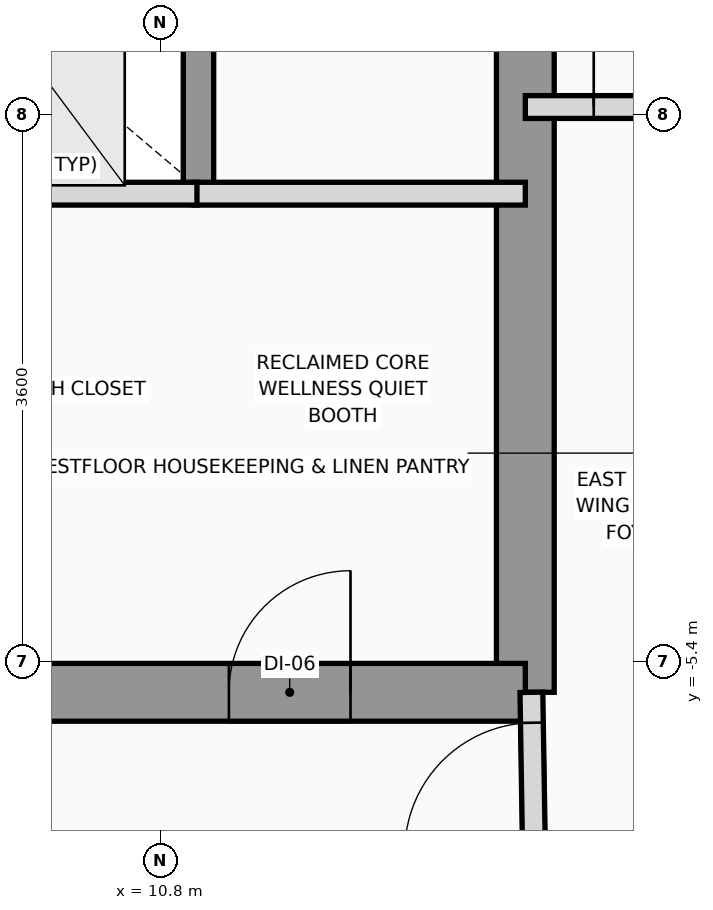
"""IFC4 building model, lengths in metres.
Left out: names, types, materials, properties, quantities, classifications, styles, units other than length and angle.
Written with IfcOpenShell. Run it as: python <this file> out.ifc"""

import sys

from ifc_helpers import new_model, si_unit, direction, frame, frame_2d, origin, place, context, subcontext, project, spatial, rectangle, extrude, source, transform, mapped, element, fill, save


model = new_model("IFC4")
c1 = context("Model", 3, precision=1e-05, world=origin(), true_north=direction((0.0, 1.0)))
c2 = subcontext(c1, "Body", "Model", "MODEL_VIEW")
j1 = project(units=[si_unit("LENGTHUNIT", "METRE"), si_unit("PLANEANGLEUNIT", "RADIAN")], contexts=[c1])
p1 = place(None, origin())
s1 = spatial("IfcSite", under=j1, at=p1, CompositionType="ELEMENT")
p2 = place(p1, origin())
s2 = spatial("IfcBuilding", under=s1, at=p2, CompositionType="ELEMENT")
p3 = place(p2, frame((0.0, 0.0, 184.2)))
s3 = spatial("IfcBuildingStorey", under=s2, at=p3, CompositionType="ELEMENT", Elevation=184.2)
p4 = place(p3, frame((13.2, -5.6, 0.0), z_axis=(0.0, 0.0, 1.0), x_axis=(0.0, 1.0, 0.0)))
e1 = element("IfcWall", 1, at=p4, inside=s3, PredefinedType="SHEAR", context=c2, shape_type="SweptSolid", body=[
    extrude(rectangle(XDim=11.2, YDim=0.38, at=frame_2d((5.6, 0.0))), origin(), (0.0, 0.0, 1.0), 3.2),
])
p5 = place(p3, frame((5.4, -5.6, 0.0), z_axis=(0.0, 0.0, 1.0), x_axis=(1.0, 0.0, 0.0)))
e2 = element("IfcWall", 2, at=p5, inside=s3, PredefinedType="SHEAR", context=c2, shape_type="SweptSolid", body=[
    extrude(rectangle(XDim=7.8, YDim=0.38, at=frame_2d((3.9, 0.0))), origin(), (0.0, 0.0, 1.0), 3.2),
])
p6 = place(p5, frame((5.85, 0.0, 0.0)))
e3 = element("IfcOpeningElement", 3, at=p6, cuts=e2, PredefinedType="OPENING", context=c2, shape_type="SweptSolid", body=[
    extrude(rectangle(XDim=0.8, YDim=2.1, at=frame_2d((0.4, 1.05))), frame((0.0, 0.2, 0.0), z_axis=(0.0, -1.0, 0.0), x_axis=(1.0, 0.0, 0.0)), (0.0, 0.0, 1.0), 0.4),
])
p7 = place(p5, frame((1.2, 0.0, 0.0)))
e4 = element("IfcOpeningElement", 4, at=p7, cuts=e2, PredefinedType="OPENING", context=c2, shape_type="SweptSolid", body=[
    extrude(rectangle(XDim=0.85, YDim=2.1, at=frame_2d((0.425, 1.05))), frame((0.0, 0.2, 0.0), z_axis=(0.0, -1.0, 0.0), x_axis=(1.0, 0.0, 0.0)), (0.0, 0.0, 1.0), 0.4),
])
p8 = place(p5, frame((3.4, 0.0, 0.0)))
e5 = element("IfcOpeningElement", 5, at=p8, cuts=e2, PredefinedType="OPENING", context=c2, shape_type="SweptSolid", body=[
    extrude(rectangle(XDim=0.85, YDim=2.1, at=frame_2d((0.425, 1.05))), frame((0.0, 0.2, 0.0), z_axis=(0.0, -1.0, 0.0), x_axis=(1.0, 0.0, 0.0)), (0.0, 0.0, 1.0), 0.4),
])
p9 = place(p3, frame((11.05, -2.28, 0.0), z_axis=(0.0, 0.0, 1.0), x_axis=(0.0, 1.0, 0.0)))
e6 = element("IfcWall", 6, at=p9, inside=s3, PredefinedType="SOLIDWALL", context=c2, shape_type="SweptSolid", body=[
    extrude(rectangle(XDim=2.18, YDim=0.2, at=frame_2d((1.09, 0.0))), origin(), (0.0, 0.0, 1.0), 3.2),
])
p10 = place(p3, frame((11.02, -2.32, 0.0), z_axis=(0.0, 0.0, 1.0), x_axis=(1.0, 0.0, 0.0)))
e7 = element("IfcWall", 7, at=p10, inside=s3, PredefinedType="PARTITIONING", context=c2, shape_type="SweptSolid", body=[
    extrude(rectangle(XDim=2.18, YDim=0.15, at=frame_2d((1.09, 0.0))), origin(), (0.0, 0.0, 1.0), 3.2),
])
p11 = place(p3, frame((8.48, -2.32, 0.0), z_axis=(0.0, 0.0, 1.0), x_axis=(1.0, 0.0, 0.0)))
e8 = element("IfcWall", 8, at=p11, inside=s3, PredefinedType="PARTITIONING", context=c2, shape_type="SweptSolid", body=[
    extrude(rectangle(XDim=2.56, YDim=0.15, at=frame_2d((1.28, 0.0))), origin(), (0.0, 0.0, 1.0), 3.2),
])
p12 = place(p3, frame((13.26, -6.85, 0.0), z_axis=(0.0, 0.0, 1.0), x_axis=(-0.016013571389, 0.999871774545, 0.0)))
e9 = element("IfcWall", 9, at=p12, inside=s3, PredefinedType="PARTITIONING", context=c2, shape_type="SweptSolid", body=[
    extrude(rectangle(XDim=1.25, YDim=0.15, at=frame_2d((0.625, 0.0))), origin(), (0.0, 0.0, 1.0), 3.2),
])
p13 = place(p12, frame((0.2, 0.0, 0.0)))
e10 = element("IfcOpeningElement", 10, at=p13, cuts=e9, PredefinedType="OPENING", context=c2, shape_type="SweptSolid", body=[
    extrude(rectangle(XDim=0.85, YDim=2.1, at=frame_2d((0.425, 1.05))), frame((0.0, 0.085, 0.0), z_axis=(0.0, -1.0, 0.0), x_axis=(1.0, 0.0, 0.0)), (0.0, 0.0, 1.0), 0.17),
])
p14 = place(p3, frame((13.2, -1.75, 0.0), z_axis=(0.0, 0.0, 1.0), x_axis=(1.0, 0.0, 0.0)))
e11 = element("IfcWall", 11, at=p14, inside=s3, PredefinedType="PARTITIONING", context=c2, shape_type="SweptSolid", body=[
    extrude(rectangle(XDim=4.45, YDim=0.15, at=frame_2d((2.225, 0.0))), origin(), (0.0, 0.0, 1.0), 2.8),
])
p15 = place(p14, frame((0.45, 0.0, 0.0)))
e12 = element("IfcOpeningElement", 12, at=p15, cuts=e11, PredefinedType="OPENING", context=c2, shape_type="SweptSolid", body=[
    extrude(rectangle(XDim=0.85, YDim=2.1, at=frame_2d((0.425, 1.05))), frame((0.0, 0.085, 0.0), z_axis=(0.0, -1.0, 0.0), x_axis=(1.0, 0.0, 0.0)), (0.0, 0.0, 1.0), 0.17),
])
m1 = source(origin(), c2, "Body", "SweptSolid", [
    extrude(rectangle(XDim=0.8, YDim=2.1, at=frame_2d((0.4, 1.05))), frame((0.0, 0.025, 0.0), z_axis=(0.0, -1.0, 0.0), x_axis=(1.0, 0.0, 0.0)), (0.0, 0.0, 1.0), 0.05),
])
p16 = place(p6, origin())
e13 = element("IfcDoor", 13, at=p16, inside=s3, OperationType="SINGLE_SWING_RIGHT", PredefinedType="DOOR", context=c2, shape_type="MappedRepresentation", body=[
    mapped(m1, transform((0.0, 0.0, 0.0), x_axis=(1.0, 0.0, 0.0), y_axis=(0.0, 1.0, 0.0), z_axis=(0.0, 0.0, 1.0), scale=1.0)),
])
fill(e3, e13)
m2 = source(origin(), c2, "Body", "SweptSolid", [
    extrude(rectangle(XDim=0.85, YDim=2.1, at=frame_2d((0.425, 1.05))), frame((0.0, 0.025, 0.0), z_axis=(0.0, -1.0, 0.0), x_axis=(1.0, 0.0, 0.0)), (0.0, 0.0, 1.0), 0.05),
])
p17 = place(p13, origin())
e14 = element("IfcDoor", 14, at=p17, inside=s3, OperationType="SINGLE_SWING_LEFT", PredefinedType="DOOR", context=c2, shape_type="MappedRepresentation", body=[
    mapped(m2, transform((0.0, 0.0, 0.0), x_axis=(1.0, 0.0, 0.0), y_axis=(0.0, 1.0, 0.0), z_axis=(0.0, 0.0, 1.0), scale=1.0)),
])
fill(e10, e14)
p18 = place(p15, origin())
e15 = element("IfcDoor", 15, at=p18, inside=s3, OperationType="SINGLE_SWING_LEFT", PredefinedType="DOOR", context=c2, shape_type="MappedRepresentation", body=[
    mapped(m2, transform((0.0, 0.0, 0.0), x_axis=(1.0, 0.0, 0.0), y_axis=(0.0, 1.0, 0.0), z_axis=(0.0, 0.0, 1.0), scale=1.0)),
])
fill(e12, e15)
save(model, sys.argv[1])
